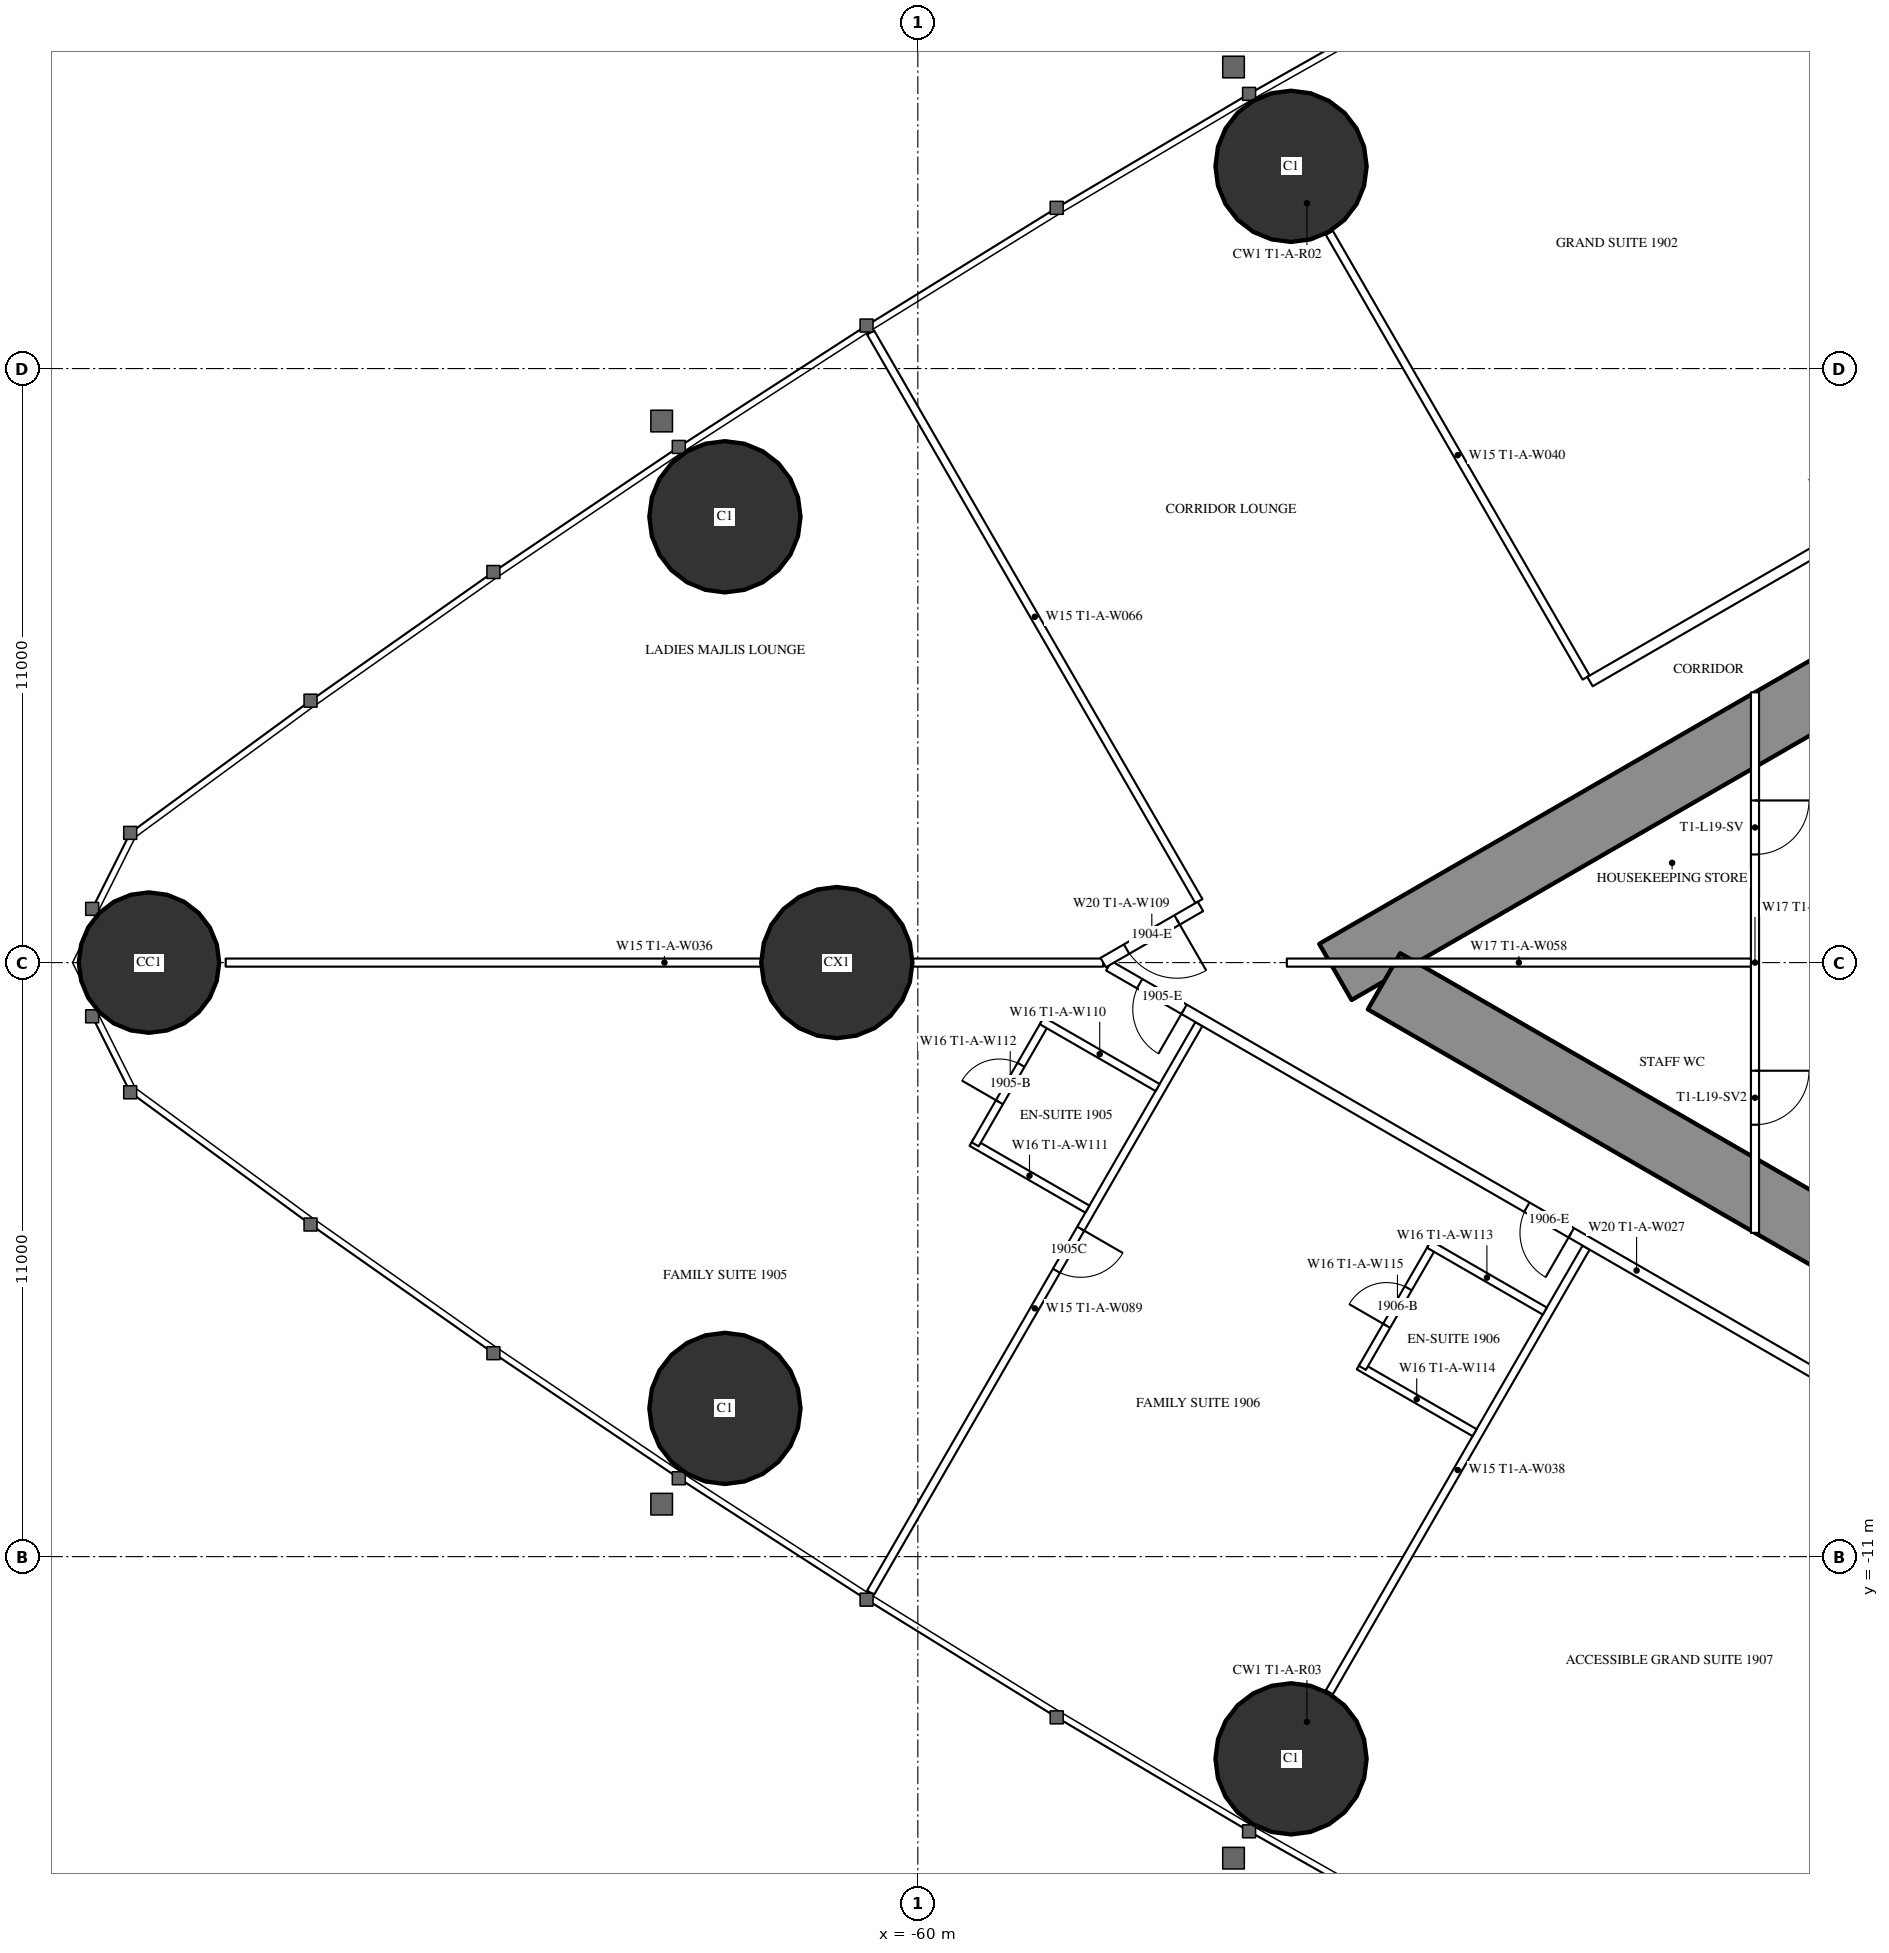
"""IFC4 building model, lengths in metres.
Left out: names, types, materials, properties, quantities, classifications, styles, units other than length and angle.
Written with IfcOpenShell. Run it as: python <this file> out.ifc"""

import sys

from ifc_helpers import new_model, si_unit, direction, frame, frame_2d, origin, origin_2d, place, context, subcontext, project, spatial, rectangle, hollow_circle, extrude, element, fill, save


model = new_model("IFC4")
c1 = context("Model", 3, precision=1e-05, world=origin(), true_north=direction((0.0, 1.0)))
c2 = subcontext(c1, "Body", "Model", "MODEL_VIEW")
j1 = project(units=[si_unit("LENGTHUNIT", "METRE"), si_unit("PLANEANGLEUNIT", "RADIAN")], contexts=[c1])
p1 = place(None, origin())
s1 = spatial("IfcSite", under=j1, at=p1, CompositionType="ELEMENT")
p2 = place(p1, origin())
s2 = spatial("IfcBuilding", under=s1, at=p2, CompositionType="ELEMENT")
p3 = place(p2, frame((0.0, 0.0, 74.0)))
s3 = spatial("IfcBuildingStorey", under=s2, at=p3, CompositionType="ELEMENT", Elevation=74.0)
p4 = place(p3, frame((-74.235, 0.0, 0.0), z_axis=(0.0, 0.0, 1.0), x_axis=(1.0, 0.0, 0.0)))
e1 = element("IfcColumn", 1, at=p4, inside=s3, PredefinedType="COLUMN", context=c2, shape_type="SweptSolid", body=[
    extrude(hollow_circle(Radius=1.3, WallThickness=0.1, at=origin_2d()), origin(), (0.0, 0.0, 1.0), 3.5),
])
for number, where, z_axis, x_axis in (
    (2, (-63.572, -8.255, 0.0), (0.0, 0.0, 1.0), (1.0, 0.0, 0.0)),
    (3, (-53.09, -14.745, 0.0), (0.0, 0.0, 1.0), (1.0, 0.0, 0.0)),
    (4, (-53.09, 14.745, 0.0), (0.0, 0.0, 1.0), (1.0, 0.0, 0.0)),
    (5, (-63.572, 8.255, 0.0), (0.0, 0.0, 1.0), (1.0, 0.0, 0.0)),
):
    element("IfcColumn", number, at=place(p3, frame(where, z_axis=z_axis, x_axis=x_axis)), inside=s3, PredefinedType="COLUMN", context=c2, shape_type="SweptSolid", body=[
        extrude(hollow_circle(Radius=1.4, WallThickness=0.12, at=origin_2d()), origin(), (0.0, 0.0, 1.0), 3.5),
    ])
p5 = place(p3, frame((-61.5, 0.0, 0.0), z_axis=(0.0, 0.0, 1.0), x_axis=(1.0, 0.0, 0.0)))
e6 = element("IfcColumn", 6, at=p5, inside=s3, PredefinedType="COLUMN", context=c2, shape_type="SweptSolid", body=[
    extrude(hollow_circle(Radius=1.4, WallThickness=0.1, at=origin_2d()), origin(), (0.0, 0.0, 1.0), 3.5),
])
p6 = place(p3, frame((-27.2, 14.3, 0.0), z_axis=(0.0, 0.0, 1.0), x_axis=(-0.866026593062, -0.499997940104, 0.0)))
e7 = element("IfcWall", 7, at=p6, inside=s3, PredefinedType="SHEAR", context=c2, shape_type="SweptSolid", body=[
    extrude(rectangle(XDim=28.946, YDim=1.2, at=frame_2d((14.473, 0.0))), origin(), (0.0, 0.0, 1.0), 3.5),
])
p7 = place(p6, frame((4.6, 0.0, 0.0)))
e8 = element("IfcOpeningElement", 8, at=p7, cuts=e7, PredefinedType="OPENING", context=c2, shape_type="SweptSolid", body=[
    extrude(rectangle(XDim=1.0, YDim=2.2, at=frame_2d((0.5, 1.1))), frame((0.0, 0.61, 0.0), z_axis=(0.0, -1.0, 0.0), x_axis=(1.0, 0.0, 0.0)), (0.0, 0.0, 1.0), 1.22),
])
p8 = place(p6, frame((13.395, 0.0, 0.0)))
e9 = element("IfcOpeningElement", 9, at=p8, cuts=e7, PredefinedType="OPENING", context=c2, shape_type="SweptSolid", body=[
    extrude(rectangle(XDim=1.8, YDim=2.2, at=frame_2d((0.9, 1.1))), frame((0.0, 0.61, 0.0), z_axis=(0.0, -1.0, 0.0), x_axis=(1.0, 0.0, 0.0)), (0.0, 0.0, 1.0), 1.22),
])
p9 = place(p3, frame((-27.2, -14.3, 0.0), z_axis=(0.0, 0.0, 1.0), x_axis=(-0.866024021859, 0.500002393557, 0.0)))
e10 = element("IfcWall", 10, at=p9, inside=s3, PredefinedType="SHEAR", context=c2, shape_type="SweptSolid", body=[
    extrude(rectangle(XDim=27.907, YDim=1.2, at=frame_2d((13.954, 0.0))), origin(), (0.0, 0.0, 1.0), 3.5),
])
p10 = place(p9, frame((4.6, 0.0, 0.0)))
e11 = element("IfcOpeningElement", 11, at=p10, cuts=e10, PredefinedType="OPENING", context=c2, shape_type="SweptSolid", body=[
    extrude(rectangle(XDim=1.0, YDim=2.2, at=frame_2d((0.5, 1.1))), frame((0.0, 0.61, 0.0), z_axis=(0.0, -1.0, 0.0), x_axis=(1.0, 0.0, 0.0)), (0.0, 0.0, 1.0), 1.22),
])
p11 = place(p9, frame((13.395, 0.0, 0.0)))
e12 = element("IfcOpeningElement", 12, at=p11, cuts=e10, PredefinedType="OPENING", context=c2, shape_type="SweptSolid", body=[
    extrude(rectangle(XDim=1.8, YDim=2.2, at=frame_2d((0.9, 1.1))), frame((0.0, 0.61, 0.0), z_axis=(0.0, -1.0, 0.0), x_axis=(1.0, 0.0, 0.0)), (0.0, 0.0, 1.0), 1.22),
])
p12 = place(p3, frame((-47.627, 5.278, 0.0), z_axis=(0.0, 0.0, 1.0), x_axis=(-0.500009844318, 0.86601972009, 0.0)))
e13 = element("IfcWall", 13, at=p12, inside=s3, PredefinedType="PARTITIONING", context=c2, shape_type="SweptSolid", body=[
    extrude(rectangle(XDim=9.51, YDim=0.15, at=frame_2d((4.755, 0.0))), origin(), (0.0, 0.0, 1.0), 2.25),
])
p13 = place(p3, frame((-54.796, 1.139, 0.0), z_axis=(0.0, 0.0, 1.0), x_axis=(-0.499998860433, 0.866026061713, 0.0)))
e14 = element("IfcWall", 14, at=p13, inside=s3, PredefinedType="PARTITIONING", context=c2, shape_type="SweptSolid", body=[
    extrude(rectangle(XDim=12.157, YDim=0.15, at=frame_2d((6.078, 0.0))), origin(), (0.0, 0.0, 1.0), 3.25),
])
p14 = place(p3, frame((-47.627, -5.278, 0.0), z_axis=(0.0, 0.0, 1.0), x_axis=(-0.500009844318, -0.86601972009, 0.0)))
e15 = element("IfcWall", 15, at=p14, inside=s3, PredefinedType="PARTITIONING", context=c2, shape_type="SweptSolid", body=[
    extrude(rectangle(XDim=9.51, YDim=0.15, at=frame_2d((4.755, 0.0))), origin(), (0.0, 0.0, 1.0), 2.25),
])
p15 = place(p3, frame((-54.796, -1.139, 0.0), z_axis=(0.0, 0.0, 1.0), x_axis=(-0.499998860433, -0.866026061713, 0.0)))
e16 = element("IfcWall", 16, at=p15, inside=s3, PredefinedType="PARTITIONING", context=c2, shape_type="SweptSolid", body=[
    extrude(rectangle(XDim=12.157, YDim=0.15, at=frame_2d((6.078, 0.0))), origin(), (0.0, 0.0, 1.0), 3.25),
])
p16 = place(p15, frame((4.375, 0.0, 0.0)))
e17 = element("IfcOpeningElement", 17, at=p16, cuts=e16, PredefinedType="OPENING", context=c2, shape_type="SweptSolid", body=[
    extrude(rectangle(XDim=0.9, YDim=2.2, at=frame_2d((0.45, 1.1))), frame((0.0, 0.085, 0.0), z_axis=(0.0, -1.0, 0.0), x_axis=(1.0, 0.0, 0.0)), (0.0, 0.0, 1.0), 0.17),
])
p17 = place(p3, frame((-56.568, 0.0, 0.0), z_axis=(0.0, 0.0, 1.0), x_axis=(-1.0, 0.0, 0.0)))
e18 = element("IfcWall", 18, at=p17, inside=s3, PredefinedType="PARTITIONING", context=c2, shape_type="SweptSolid", body=[
    extrude(rectangle(XDim=16.247, YDim=0.15, at=frame_2d((8.124, 0.0))), origin(), (0.0, 0.0, 1.0), 2.25),
])
p18 = place(p3, frame((-36.92, -11.344, 0.0), z_axis=(0.0, 0.0, 1.0), x_axis=(-0.866028313256, 0.499994960614, 0.0)))
e19 = element("IfcWall", 19, at=p18, inside=s3, PredefinedType="PARTITIONING", context=c2, shape_type="SweptSolid", body=[
    extrude(rectangle(XDim=22.568, YDim=0.2, at=frame_2d((11.284, 0.0))), origin(), (0.0, 0.0, 1.0), 3.25),
])
p19 = place(p18, frame((20.958, 0.0, 0.0)))
e20 = element("IfcOpeningElement", 20, at=p19, cuts=e19, PredefinedType="OPENING", context=c2, shape_type="SweptSolid", body=[
    extrude(rectangle(XDim=0.95, YDim=2.2, at=frame_2d((0.475, 1.1))), frame((0.0, 0.11, 0.0), z_axis=(0.0, -1.0, 0.0), x_axis=(1.0, 0.0, 0.0)), (0.0, 0.0, 1.0), 0.22),
])
p20 = place(p18, frame((12.68, 0.0, 0.0)))
e21 = element("IfcOpeningElement", 21, at=p20, cuts=e19, PredefinedType="OPENING", context=c2, shape_type="SweptSolid", body=[
    extrude(rectangle(XDim=0.95, YDim=2.2, at=frame_2d((0.475, 1.1))), frame((0.0, 0.11, 0.0), z_axis=(0.0, -1.0, 0.0), x_axis=(1.0, 0.0, 0.0)), (0.0, 0.0, 1.0), 0.22),
])
p21 = place(p18, frame((3.35, 0.0, 0.0)))
e22 = element("IfcOpeningElement", 22, at=p21, cuts=e19, PredefinedType="OPENING", context=c2, shape_type="SweptSolid", body=[
    extrude(rectangle(XDim=1.0, YDim=2.2, at=frame_2d((0.5, 1.1))), frame((0.0, 0.11, 0.0), z_axis=(0.0, -1.0, 0.0), x_axis=(1.0, 0.0, 0.0)), (0.0, 0.0, 1.0), 0.22),
])
p22 = place(p3, frame((-37.7, 10.894, 0.0), z_axis=(0.0, 0.0, 1.0), x_axis=(-0.866024459167, -0.500001636122, 0.0)))
e23 = element("IfcWall", 23, at=p22, inside=s3, PredefinedType="PARTITIONING", context=c2, shape_type="SweptSolid", body=[
    extrude(rectangle(XDim=11.38, YDim=0.2, at=frame_2d((5.69, 0.0))), origin(), (0.0, 0.0, 1.0), 3.25),
])
p23 = place(p22, frame((0.6, 0.0, 0.0)))
e24 = element("IfcOpeningElement", 24, at=p23, cuts=e23, PredefinedType="OPENING", context=c2, shape_type="SweptSolid", body=[
    extrude(rectangle(XDim=0.95, YDim=2.2, at=frame_2d((0.475, 1.1))), frame((0.0, 0.11, 0.0), z_axis=(0.0, -1.0, 0.0), x_axis=(1.0, 0.0, 0.0)), (0.0, 0.0, 1.0), 0.22),
])
p24 = place(p3, frame((-54.768, 1.04, 0.0), z_axis=(0.0, 0.0, 1.0), x_axis=(-0.866052632827, -0.499952834948, 0.0)))
e25 = element("IfcWall", 25, at=p24, inside=s3, PredefinedType="PARTITIONING", context=c2, shape_type="SweptSolid", body=[
    extrude(rectangle(XDim=2.079, YDim=0.2, at=frame_2d((1.04, 0.0))), origin(), (0.0, 0.0, 1.0), 3.25),
])
p25 = place(p24, frame((0.5, 0.0, 0.0)))
e26 = element("IfcOpeningElement", 26, at=p25, cuts=e25, PredefinedType="OPENING", context=c2, shape_type="SweptSolid", body=[
    extrude(rectangle(XDim=1.079, YDim=2.2, at=frame_2d((0.54, 1.1))), frame((0.0, 0.11, 0.0), z_axis=(0.0, -1.0, 0.0), x_axis=(1.0, 0.0, 0.0)), (0.0, 0.0, 1.0), 0.22),
])
p26 = place(p3, frame((-56.861, -4.565, 0.0), z_axis=(0.0, 0.0, 1.0), x_axis=(-0.86604923931, 0.499958713387, 0.0)))
e27 = element("IfcWall", 27, at=p26, inside=s3, PredefinedType="PARTITIONING", context=c2, shape_type="SweptSolid", body=[
    extrude(rectangle(XDim=2.475, YDim=0.15, at=frame_2d((1.237, 0.0))), origin(), (0.0, 0.0, 1.0), 3.25),
])
p27 = place(p3, frame((-57.639, -1.114, 0.0), z_axis=(0.0, 0.0, 1.0), x_axis=(-0.500006934395, -0.866021400173, 0.0)))
e28 = element("IfcWall", 28, at=p27, inside=s3, PredefinedType="PARTITIONING", context=c2, shape_type="SweptSolid", body=[
    extrude(rectangle(XDim=2.6, YDim=0.15, at=frame_2d((1.3, 0.0))), origin(), (0.0, 0.0, 1.0), 3.25),
])
p28 = place(p27, frame((0.9, 0.0, 0.0)))
e29 = element("IfcOpeningElement", 29, at=p28, cuts=e28, PredefinedType="OPENING", context=c2, shape_type="SweptSolid", body=[
    extrude(rectangle(XDim=0.8, YDim=2.2, at=frame_2d((0.4, 1.1))), frame((0.0, 0.085, 0.0), z_axis=(0.0, -1.0, 0.0), x_axis=(1.0, 0.0, 0.0)), (0.0, 0.0, 1.0), 0.17),
])
p29 = place(p3, frame((-55.561, -2.313, 0.0), z_axis=(0.0, 0.0, 1.0), x_axis=(-0.86604923931, 0.499958713387, 0.0)))
e30 = element("IfcWall", 30, at=p29, inside=s3, PredefinedType="PARTITIONING", context=c2, shape_type="SweptSolid", body=[
    extrude(rectangle(XDim=2.475, YDim=0.15, at=frame_2d((1.237, 0.0))), origin(), (0.0, 0.0, 1.0), 3.25),
])
p30 = place(p3, frame((-49.692, -8.704, 0.0), z_axis=(0.0, 0.0, 1.0), x_axis=(-0.866073894602, 0.499916002032, 0.0)))
e31 = element("IfcWall", 31, at=p30, inside=s3, PredefinedType="PARTITIONING", context=c2, shape_type="SweptSolid", body=[
    extrude(rectangle(XDim=2.475, YDim=0.15, at=frame_2d((1.238, 0.0))), origin(), (0.0, 0.0, 1.0), 3.25),
])
p31 = place(p3, frame((-50.47, -5.253, 0.0), z_axis=(0.0, 0.0, 1.0), x_axis=(-0.500006934395, -0.866021400173, 0.0)))
e32 = element("IfcWall", 32, at=p31, inside=s3, PredefinedType="PARTITIONING", context=c2, shape_type="SweptSolid", body=[
    extrude(rectangle(XDim=2.6, YDim=0.15, at=frame_2d((1.3, 0.0))), origin(), (0.0, 0.0, 1.0), 3.25),
])
p32 = place(p31, frame((0.9, 0.0, 0.0)))
e33 = element("IfcOpeningElement", 33, at=p32, cuts=e32, PredefinedType="OPENING", context=c2, shape_type="SweptSolid", body=[
    extrude(rectangle(XDim=0.8, YDim=2.2, at=frame_2d((0.4, 1.1))), frame((0.0, 0.085, 0.0), z_axis=(0.0, -1.0, 0.0), x_axis=(1.0, 0.0, 0.0)), (0.0, 0.0, 1.0), 0.17),
])
p33 = place(p3, frame((-48.392, -6.453, 0.0), z_axis=(0.0, 0.0, 1.0), x_axis=(-0.86604923931, 0.499958713387, 0.0)))
e34 = element("IfcWall", 34, at=p33, inside=s3, PredefinedType="PARTITIONING", context=c2, shape_type="SweptSolid", body=[
    extrude(rectangle(XDim=2.475, YDim=0.15, at=frame_2d((1.237, 0.0))), origin(), (0.0, 0.0, 1.0), 3.25),
])
p34 = place(p3, frame((-44.5, 5.005, 0.0), z_axis=(0.0, 0.0, 1.0), x_axis=(0.0, -1.0, 0.0)))
e35 = element("IfcWall", 35, at=p34, inside=s3, PredefinedType="PARTITIONING", context=c2, shape_type="SweptSolid", body=[
    extrude(rectangle(XDim=10.009, YDim=0.15, at=frame_2d((5.005, 0.0))), origin(), (0.0, 0.0, 1.0), 2.45),
])
p35 = place(p34, frame((2.002, 0.0, 0.0)))
e36 = element("IfcOpeningElement", 36, at=p35, cuts=e35, PredefinedType="OPENING", context=c2, shape_type="SweptSolid", body=[
    extrude(rectangle(XDim=1.0, YDim=2.2, at=frame_2d((0.5, 1.1))), frame((0.0, 0.085, 0.0), z_axis=(0.0, -1.0, 0.0), x_axis=(1.0, 0.0, 0.0)), (0.0, 0.0, 1.0), 0.17),
])
p36 = place(p34, frame((7.007, 0.0, 0.0)))
e37 = element("IfcOpeningElement", 37, at=p36, cuts=e35, PredefinedType="OPENING", context=c2, shape_type="SweptSolid", body=[
    extrude(rectangle(XDim=1.0, YDim=2.2, at=frame_2d((0.5, 1.1))), frame((0.0, 0.085, 0.0), z_axis=(0.0, -1.0, 0.0), x_axis=(1.0, 0.0, 0.0)), (0.0, 0.0, 1.0), 0.17),
])
p37 = place(p3, frame((-44.575, 0.0, 0.0), z_axis=(0.0, 0.0, 1.0), x_axis=(-1.0, 0.0, 0.0)))
e38 = element("IfcWall", 38, at=p37, inside=s3, PredefinedType="PARTITIONING", context=c2, shape_type="SweptSolid", body=[
    extrude(rectangle(XDim=8.593, YDim=0.15, at=frame_2d((4.297, 0.0))), origin(), (0.0, 0.0, 1.0), 2.25),
])
p38 = place(p25, origin())
e39 = element("IfcDoor", 39, at=p38, inside=s3, OperationType="SINGLE_SWING_LEFT", PredefinedType="DOOR", context=c2, shape_type="SweptSolid", body=[
    extrude(rectangle(XDim=1.079, YDim=2.2, at=frame_2d((0.54, 1.1))), frame((0.0, 0.025, 0.0), z_axis=(0.0, -1.0, 0.0), x_axis=(1.0, 0.0, 0.0)), (0.0, 0.0, 1.0), 0.05),
])
fill(e26, e39)
p39 = place(p28, origin())
e40 = element("IfcDoor", 40, at=p39, inside=s3, OperationType="SINGLE_SWING_RIGHT", PredefinedType="DOOR", context=c2, shape_type="SweptSolid", body=[
    extrude(rectangle(XDim=0.8, YDim=2.2, at=frame_2d((0.4, 1.1))), frame((0.0, 0.025, 0.0), z_axis=(0.0, -1.0, 0.0), x_axis=(1.0, 0.0, 0.0)), (0.0, 0.0, 1.0), 0.05),
])
fill(e29, e40)
p40 = place(p19, origin())
e41 = element("IfcDoor", 41, at=p40, inside=s3, OperationType="SINGLE_SWING_LEFT", PredefinedType="DOOR", context=c2, shape_type="SweptSolid", body=[
    extrude(rectangle(XDim=0.95, YDim=2.2, at=frame_2d((0.475, 1.1))), frame((0.0, 0.025, 0.0), z_axis=(0.0, -1.0, 0.0), x_axis=(1.0, 0.0, 0.0)), (0.0, 0.0, 1.0), 0.05),
])
fill(e20, e41)
p41 = place(p32, origin())
e42 = element("IfcDoor", 42, at=p41, inside=s3, OperationType="SINGLE_SWING_RIGHT", PredefinedType="DOOR", context=c2, shape_type="SweptSolid", body=[
    extrude(rectangle(XDim=0.8, YDim=2.2, at=frame_2d((0.4, 1.1))), frame((0.0, 0.025, 0.0), z_axis=(0.0, -1.0, 0.0), x_axis=(1.0, 0.0, 0.0)), (0.0, 0.0, 1.0), 0.05),
])
fill(e33, e42)
p42 = place(p20, origin())
e43 = element("IfcDoor", 43, at=p42, inside=s3, OperationType="SINGLE_SWING_LEFT", PredefinedType="DOOR", context=c2, shape_type="SweptSolid", body=[
    extrude(rectangle(XDim=0.95, YDim=2.2, at=frame_2d((0.475, 1.1))), frame((0.0, 0.025, 0.0), z_axis=(0.0, -1.0, 0.0), x_axis=(1.0, 0.0, 0.0)), (0.0, 0.0, 1.0), 0.05),
])
fill(e21, e43)
p43 = place(p16, origin())
e44 = element("IfcDoor", 44, at=p43, inside=s3, OperationType="SINGLE_SWING_LEFT", PredefinedType="DOOR", context=c2, shape_type="SweptSolid", body=[
    extrude(rectangle(XDim=0.9, YDim=2.2, at=frame_2d((0.45, 1.1))), frame((0.0, 0.025, 0.0), z_axis=(0.0, -1.0, 0.0), x_axis=(1.0, 0.0, 0.0)), (0.0, 0.0, 1.0), 0.05),
])
fill(e17, e44)
p44 = place(p35, origin())
e45 = element("IfcDoor", 45, at=p44, inside=s3, OperationType="SINGLE_SWING_LEFT", PredefinedType="DOOR", context=c2, shape_type="SweptSolid", body=[
    extrude(rectangle(XDim=1.0, YDim=2.2, at=frame_2d((0.5, 1.1))), frame((0.0, 0.025, 0.0), z_axis=(0.0, -1.0, 0.0), x_axis=(1.0, 0.0, 0.0)), (0.0, 0.0, 1.0), 0.05),
])
fill(e36, e45)
p45 = place(p36, origin())
e46 = element("IfcDoor", 46, at=p45, inside=s3, OperationType="SINGLE_SWING_LEFT", PredefinedType="DOOR", context=c2, shape_type="SweptSolid", body=[
    extrude(rectangle(XDim=1.0, YDim=2.2, at=frame_2d((0.5, 1.1))), frame((0.0, 0.025, 0.0), z_axis=(0.0, -1.0, 0.0), x_axis=(1.0, 0.0, 0.0)), (0.0, 0.0, 1.0), 0.05),
])
fill(e37, e46)
save(model, sys.argv[1])
